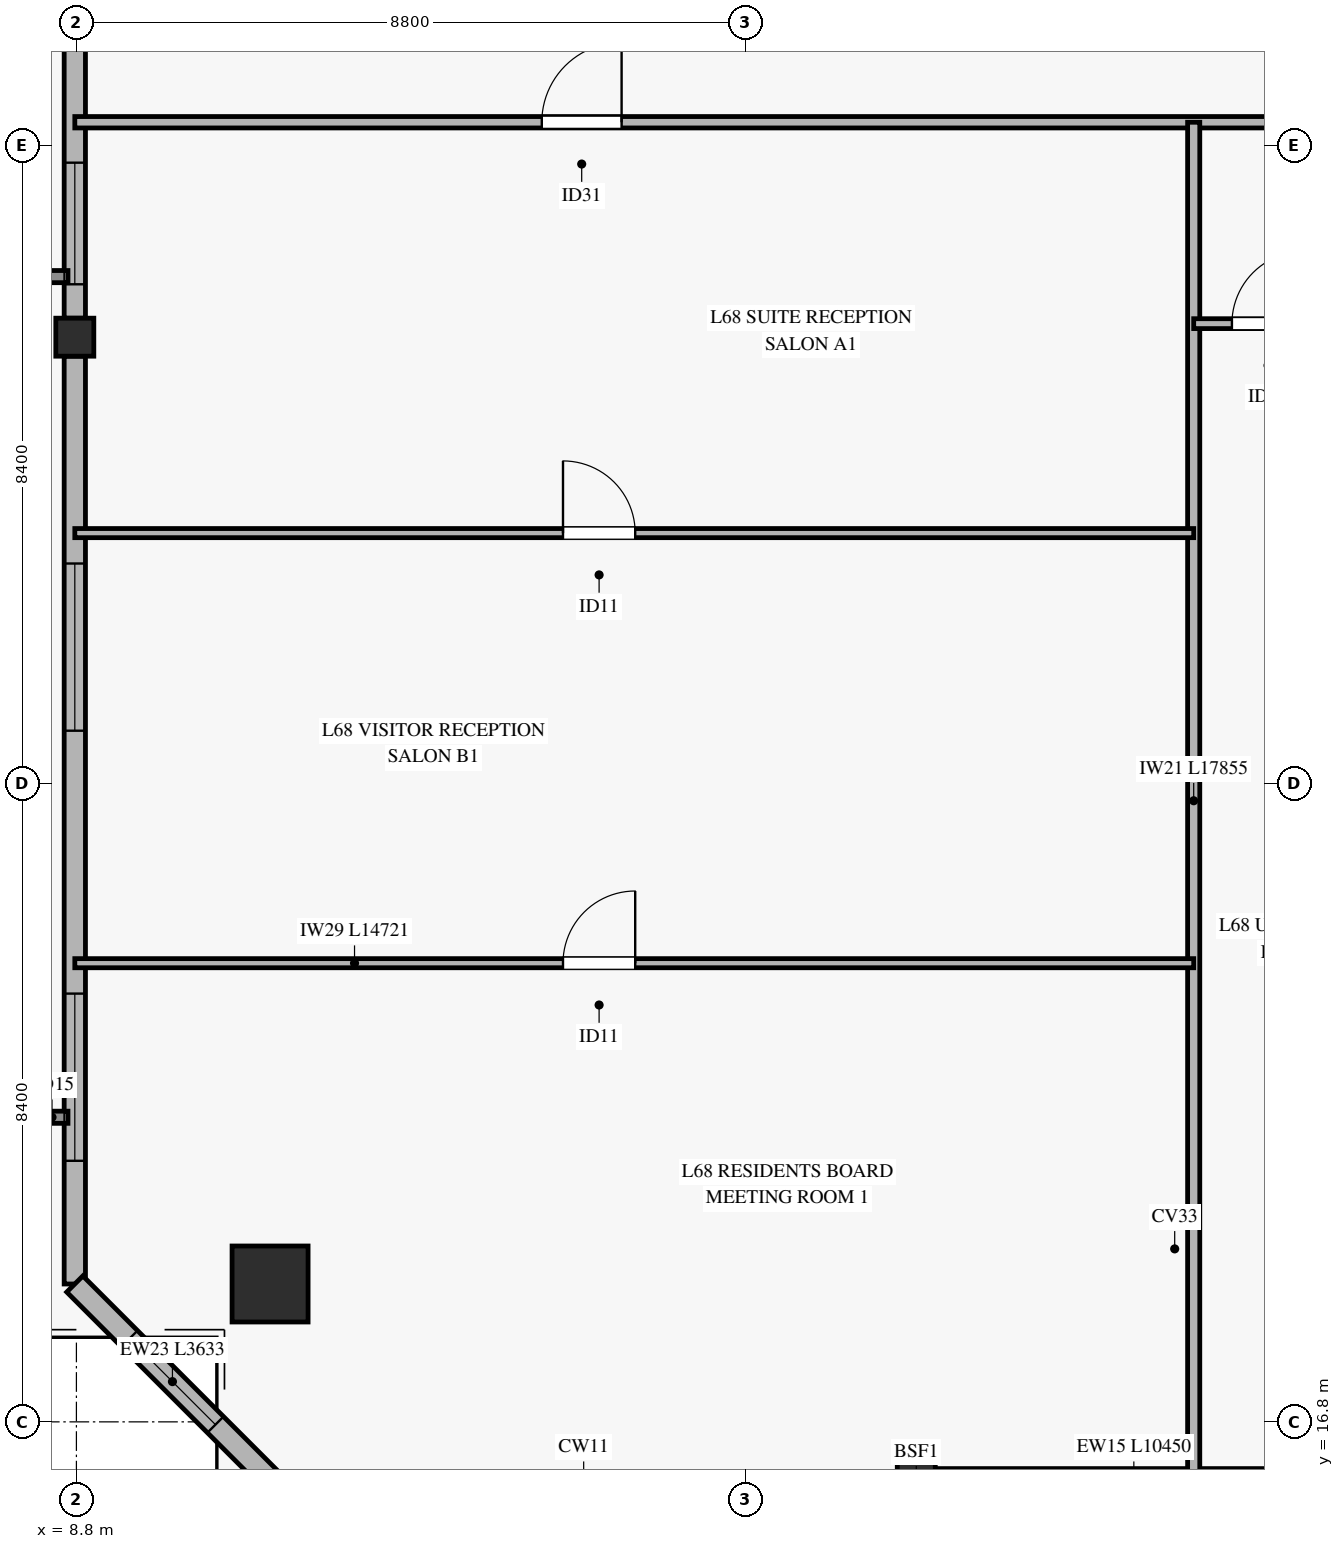
"""IFC4 building model, lengths in metres.
Left out: names, types, materials, properties, quantities, classifications, styles, units other than length and angle.
Written with IfcOpenShell. Run it as: python <this file> out.ifc"""

import sys

from ifc_helpers import new_model, si_unit, direction, frame, frame_2d, origin, origin_2d, place, context, subcontext, project, spatial, rectangle, hollow_rectangle, extrude, source, transform, mapped, element, fill, save


model = new_model("IFC4")
c1 = context("Model", 3, precision=1e-05, world=origin(), true_north=direction((0.0, 1.0)))
c2 = subcontext(c1, "Body", "Model", "MODEL_VIEW")
j1 = project(units=[si_unit("LENGTHUNIT", "METRE"), si_unit("PLANEANGLEUNIT", "RADIAN")], contexts=[c1])
p1 = place(None, origin())
s1 = spatial("IfcSite", under=j1, at=p1, CompositionType="ELEMENT")
p2 = place(p1, origin())
s2 = spatial("IfcBuilding", under=s1, at=p2, CompositionType="ELEMENT")
p3 = place(p2, frame((0.0, 0.0, 265.5)))
s3 = spatial("IfcBuildingStorey", under=s2, at=p3, CompositionType="ELEMENT", Elevation=265.5)
m1 = source(origin(), c2, "Body", "SweptSolid", [
    extrude(hollow_rectangle(XDim=1.0, YDim=1.0, WallThickness=0.045, at=origin_2d()), origin(), (0.0, 0.0, 1.0), 3.326),
])
p4 = place(p3, frame((11.348, 18.614, 0.0), z_axis=(0.110977181902, 0.266066325657, 0.957545181936), x_axis=(-0.922933739471, 0.384958845263, 0.0)))
e1 = element("IfcColumn", 1, at=p4, inside=s3, PredefinedType="COLUMN", context=c2, shape_type="MappedRepresentation", body=[
    mapped(m1, transform((0.0, 0.0, 0.0), x_axis=(1.0, 0.0, 0.0), y_axis=(0.0, 1.0, 0.0), z_axis=(0.0, 0.0, 1.0), scale=1.0)),
])
m2 = source(origin(), c2, "Body", "SweptSolid", [
    extrude(hollow_rectangle(XDim=0.5, YDim=0.5, WallThickness=0.024, at=origin_2d()), origin(), (0.0, 0.0, 1.0), 3.318),
])
p5 = place(p3, frame((19.85, 16.045, 0.0), z_axis=(0.0, 0.280604531731, 0.959823471672), x_axis=(-1.0, 0.0, 0.0)))
e2 = element("IfcColumn", 2, at=p5, inside=s3, PredefinedType="COLUMN", context=c2, shape_type="MappedRepresentation", body=[
    mapped(m2, transform((0.0, 0.0, 0.0), x_axis=(1.0, 0.0, 0.0), y_axis=(0.0, 1.0, 0.0), z_axis=(0.0, 0.0, 1.0), scale=1.0)),
])
m3 = source(origin(), c2, "Body", "SweptSolid", [
    extrude(hollow_rectangle(XDim=0.5, YDim=0.5, WallThickness=0.024, at=origin_2d()), origin(), (0.0, 0.0, 1.0), 3.246),
])
p6 = place(p3, frame((8.779, 31.072, 0.0), z_axis=(0.127876528395, 0.143597819239, 0.981339523201), x_axis=(-0.746804669772, 0.665043446104, 0.0)))
e3 = element("IfcColumn", 3, at=p6, inside=s3, PredefinedType="COLUMN", context=c2, shape_type="MappedRepresentation", body=[
    mapped(m3, transform((0.0, 0.0, 0.0), x_axis=(1.0, 0.0, 0.0), y_axis=(0.0, 1.0, 0.0), z_axis=(0.0, 0.0, 1.0), scale=1.0)),
])
p7 = place(p3, frame((20.1, 16.045, 0.0), z_axis=(0.0, 0.0, 1.0), x_axis=(1.0, 0.0, 0.0)))
e4 = element("IfcWall", 4, at=p7, inside=s3, PredefinedType="SOLIDWALL", context=c2, shape_type="SweptSolid", body=[
    extrude(rectangle(XDim=10.45, YDim=0.28, at=frame_2d((5.225, 0.0))), origin(), (0.0, 0.0, 1.0), 2.815),
])
p8 = place(p7, frame((4.3, 0.0, 0.0)))
e5 = element("IfcOpeningElement", 5, at=p8, cuts=e4, PredefinedType="OPENING", context=c2, shape_type="SweptSolid", body=[
    extrude(rectangle(XDim=1.8, YDim=2.25, at=frame_2d((0.9, 1.125))), frame((0.0, 0.15, 0.0), z_axis=(0.0, -1.0, 0.0), x_axis=(1.0, 0.0, 0.0)), (0.0, 0.0, 1.0), 0.3),
])
p9 = place(p7, frame((0.65, 0.0, 0.45)))
e6 = element("IfcOpeningElement", 6, at=p9, cuts=e4, PredefinedType="OPENING", context=c2, shape_type="SweptSolid", body=[
    extrude(rectangle(XDim=2.2, YDim=2.1, at=frame_2d((1.1, 1.05))), frame((0.0, 0.15, 0.0), z_axis=(0.0, -1.0, 0.0), x_axis=(1.0, 0.0, 0.0)), (0.0, 0.0, 1.0), 0.3),
])
p10 = place(p7, frame((7.35, 0.0, 0.45)))
e7 = element("IfcOpeningElement", 7, at=p10, cuts=e4, PredefinedType="OPENING", context=c2, shape_type="SweptSolid", body=[
    extrude(rectangle(XDim=1.6, YDim=2.0, at=frame_2d((0.8, 1.0))), frame((0.0, 0.15, 0.0), z_axis=(0.0, -1.0, 0.0), x_axis=(1.0, 0.0, 0.0)), (0.0, 0.0, 1.0), 0.3),
])
p11 = place(p3, frame((8.779, 18.614, 0.0), z_axis=(0.0, 0.0, 1.0), x_axis=(0.0, 1.0, 0.0)))
e8 = element("IfcWall", 8, at=p11, inside=s3, PredefinedType="SOLIDWALL", context=c2, shape_type="SweptSolid", body=[
    extrude(rectangle(XDim=12.208, YDim=0.28, at=frame_2d((6.104, 0.0))), origin(), (0.0, 0.0, 1.0), 2.815),
])
p12 = place(p11, frame((1.621, 0.0, 0.45)))
e9 = element("IfcOpeningElement", 9, at=p12, cuts=e8, PredefinedType="OPENING", context=c2, shape_type="SweptSolid", body=[
    extrude(rectangle(XDim=2.2, YDim=2.1, at=frame_2d((1.1, 1.05))), frame((0.0, 0.15, 0.0), z_axis=(0.0, -1.0, 0.0), x_axis=(1.0, 0.0, 0.0)), (0.0, 0.0, 1.0), 0.3),
])
p13 = place(p11, frame((7.28, 0.0, 0.45)))
e10 = element("IfcOpeningElement", 10, at=p13, cuts=e8, PredefinedType="OPENING", context=c2, shape_type="SweptSolid", body=[
    extrude(rectangle(XDim=2.2, YDim=2.1, at=frame_2d((1.1, 1.05))), frame((0.0, 0.15, 0.0), z_axis=(0.0, -1.0, 0.0), x_axis=(1.0, 0.0, 0.0)), (0.0, 0.0, 1.0), 0.3),
])
p14 = place(p3, frame((8.779, 31.322, 0.0), z_axis=(0.0, 0.0, 1.0), x_axis=(0.0, 1.0, 0.0)))
e11 = element("IfcWall", 11, at=p14, inside=s3, PredefinedType="SOLIDWALL", context=c2, shape_type="SweptSolid", body=[
    extrude(rectangle(XDim=12.208, YDim=0.28, at=frame_2d((6.104, 0.0))), origin(), (0.0, 0.0, 1.0), 2.815),
])
p15 = place(p14, frame((0.446, 0.0, 0.45)))
e12 = element("IfcOpeningElement", 12, at=p15, cuts=e11, PredefinedType="OPENING", context=c2, shape_type="SweptSolid", body=[
    extrude(rectangle(XDim=1.6, YDim=2.0, at=frame_2d((0.8, 1.0))), frame((0.0, 0.15, 0.0), z_axis=(0.0, -1.0, 0.0), x_axis=(1.0, 0.0, 0.0)), (0.0, 0.0, 1.0), 0.3),
])
p16 = place(p3, frame((8.779, 18.614, 0.0), z_axis=(0.0, 0.0, 1.0), x_axis=(0.707073180636, -0.70714038014, 0.0)))
e13 = element("IfcWall", 13, at=p16, inside=s3, PredefinedType="SOLIDWALL", context=c2, shape_type="SweptSolid", body=[
    extrude(rectangle(XDim=3.633, YDim=0.3, at=frame_2d((1.816, 0.0))), origin(), (0.0, 0.0, 1.0), 2.815),
])
p17 = place(p16, frame((1.017, 0.0, 0.45)))
e14 = element("IfcOpeningElement", 14, at=p17, cuts=e13, PredefinedType="OPENING", context=c2, shape_type="SweptSolid", body=[
    extrude(rectangle(XDim=1.6, YDim=2.0, at=frame_2d((0.8, 1.0))), frame((0.0, 0.16, 0.0), z_axis=(0.0, -1.0, 0.0), x_axis=(1.0, 0.0, 0.0)), (0.0, 0.0, 1.0), 0.32),
])
p18 = place(p3, frame((8.779, 33.9, 0.0), z_axis=(0.0, 0.0, 1.0), x_axis=(1.0, 0.0, 0.0)))
e15 = element("IfcWall", 15, at=p18, inside=s3, PredefinedType="PARTITIONING", context=c2, shape_type="SweptSolid", body=[
    extrude(rectangle(XDim=52.843, YDim=0.15, at=frame_2d((26.421, 0.0))), origin(), (0.0, 0.0, 1.0), 2.47),
])
p19 = place(p18, frame((6.144, 0.0, 0.0)))
e16 = element("IfcOpeningElement", 16, at=p19, cuts=e15, PredefinedType="OPENING", context=c2, shape_type="SweptSolid", body=[
    extrude(rectangle(XDim=1.05, YDim=2.15, at=frame_2d((0.525, 1.075))), frame((0.0, 0.085, 0.0), z_axis=(0.0, -1.0, 0.0), x_axis=(1.0, 0.0, 0.0)), (0.0, 0.0, 1.0), 0.17),
])
p20 = place(p18, frame((17.646, 0.0, 0.0)))
e17 = element("IfcOpeningElement", 17, at=p20, cuts=e15, PredefinedType="OPENING", context=c2, shape_type="SweptSolid", body=[
    extrude(rectangle(XDim=1.05, YDim=2.15, at=frame_2d((0.525, 1.075))), frame((0.0, 0.085, 0.0), z_axis=(0.0, -1.0, 0.0), x_axis=(1.0, 0.0, 0.0)), (0.0, 0.0, 1.0), 0.17),
])
p21 = place(p18, frame((24.174, 0.0, 0.0)))
e18 = element("IfcOpeningElement", 18, at=p21, cuts=e15, PredefinedType="OPENING", context=c2, shape_type="SweptSolid", body=[
    extrude(rectangle(XDim=1.05, YDim=2.15, at=frame_2d((0.525, 1.075))), frame((0.0, 0.085, 0.0), z_axis=(0.0, -1.0, 0.0), x_axis=(1.0, 0.0, 0.0)), (0.0, 0.0, 1.0), 0.17),
])
p22 = place(p18, frame((31.096, 0.0, 0.0)))
e19 = element("IfcOpeningElement", 19, at=p22, cuts=e15, PredefinedType="OPENING", context=c2, shape_type="SweptSolid", body=[
    extrude(rectangle(XDim=1.05, YDim=2.15, at=frame_2d((0.525, 1.075))), frame((0.0, 0.085, 0.0), z_axis=(0.0, -1.0, 0.0), x_axis=(1.0, 0.0, 0.0)), (0.0, 0.0, 1.0), 0.17),
])
p23 = place(p18, frame((37.241, 0.0, 0.0)))
e20 = element("IfcOpeningElement", 20, at=p23, cuts=e15, PredefinedType="OPENING", context=c2, shape_type="SweptSolid", body=[
    extrude(rectangle(XDim=1.05, YDim=2.15, at=frame_2d((0.525, 1.075))), frame((0.0, 0.085, 0.0), z_axis=(0.0, -1.0, 0.0), x_axis=(1.0, 0.0, 0.0)), (0.0, 0.0, 1.0), 0.17),
])
p24 = place(p18, frame((45.201, 0.0, 0.0)))
e21 = element("IfcOpeningElement", 21, at=p24, cuts=e15, PredefinedType="OPENING", context=c2, shape_type="SweptSolid", body=[
    extrude(rectangle(XDim=1.05, YDim=2.15, at=frame_2d((0.525, 1.075))), frame((0.0, 0.085, 0.0), z_axis=(0.0, -1.0, 0.0), x_axis=(1.0, 0.0, 0.0)), (0.0, 0.0, 1.0), 0.17),
])
p25 = place(p3, frame((23.5, 16.045, 0.0), z_axis=(0.0, 0.0, 1.0), x_axis=(0.0, 1.0, 0.0)))
e22 = element("IfcWall", 22, at=p25, inside=s3, PredefinedType="PARTITIONING", context=c2, shape_type="SweptSolid", body=[
    extrude(rectangle(XDim=17.855, YDim=0.16, at=frame_2d((8.927, 0.0))), origin(), (0.0, 0.0, 1.0), 2.77),
])
p26 = place(p3, frame((8.779, 22.835, 0.0), z_axis=(0.0, 0.0, 1.0), x_axis=(1.0, 0.0, 0.0)))
e23 = element("IfcWall", 23, at=p26, inside=s3, PredefinedType="PARTITIONING", context=c2, shape_type="SweptSolid", body=[
    extrude(rectangle(XDim=14.721, YDim=0.12, at=frame_2d((7.36, 0.0))), origin(), (0.0, 0.0, 1.0), 2.47),
])
p27 = place(p26, frame((6.423, 0.0, 0.0)))
e24 = element("IfcOpeningElement", 24, at=p27, cuts=e23, PredefinedType="OPENING", context=c2, shape_type="SweptSolid", body=[
    extrude(rectangle(XDim=0.95, YDim=2.1, at=frame_2d((0.475, 1.05))), frame((0.0, 0.07, 0.0), z_axis=(0.0, -1.0, 0.0), x_axis=(1.0, 0.0, 0.0)), (0.0, 0.0, 1.0), 0.14),
])
p28 = place(p3, frame((8.779, 28.494, 0.0), z_axis=(0.0, 0.0, 1.0), x_axis=(1.0, 0.0, 0.0)))
e25 = element("IfcWall", 25, at=p28, inside=s3, PredefinedType="PARTITIONING", context=c2, shape_type="SweptSolid", body=[
    extrude(rectangle(XDim=14.721, YDim=0.12, at=frame_2d((7.36, 0.0))), origin(), (0.0, 0.0, 1.0), 2.47),
])
p29 = place(p28, frame((6.423, 0.0, 0.0)))
e26 = element("IfcOpeningElement", 26, at=p29, cuts=e25, PredefinedType="OPENING", context=c2, shape_type="SweptSolid", body=[
    extrude(rectangle(XDim=0.95, YDim=2.1, at=frame_2d((0.475, 1.05))), frame((0.0, 0.07, 0.0), z_axis=(0.0, -1.0, 0.0), x_axis=(1.0, 0.0, 0.0)), (0.0, 0.0, 1.0), 0.14),
])
p30 = place(p3, frame((23.5, 31.25, 0.0), z_axis=(0.0, 0.0, 1.0), x_axis=(1.0, 0.0, 0.0)))
e27 = element("IfcWall", 27, at=p30, inside=s3, PredefinedType="PARTITIONING", context=c2, shape_type="SweptSolid", body=[
    extrude(rectangle(XDim=1.715, YDim=0.13, at=frame_2d((0.857, 0.0))), origin(), (0.0, 0.0, 1.0), 3.185),
])
p31 = place(p30, frame((0.503, 0.0, 0.0)))
e28 = element("IfcOpeningElement", 28, at=p31, cuts=e27, PredefinedType="OPENING", context=c2, shape_type="SweptSolid", body=[
    extrude(rectangle(XDim=0.95, YDim=2.1, at=frame_2d((0.475, 1.05))), frame((0.0, 0.075, 0.0), z_axis=(0.0, -1.0, 0.0), x_axis=(1.0, 0.0, 0.0)), (0.0, 0.0, 1.0), 0.15),
])
m4 = source(origin(), c2, "Body", "SweptSolid", [
    extrude(rectangle(XDim=2.2, YDim=2.1, at=frame_2d((1.1, 1.05))), frame((0.0, 0.03, 0.0), z_axis=(0.0, -1.0, 0.0), x_axis=(1.0, 0.0, 0.0)), (0.0, 0.0, 1.0), 0.06),
])
p32 = place(p12, origin())
e29 = element("IfcWindow", 29, at=p32, inside=s3, PartitioningType="SINGLE_PANEL", PredefinedType="WINDOW", context=c2, shape_type="MappedRepresentation", body=[
    mapped(m4, transform((0.0, 0.0, 0.0), x_axis=(1.0, 0.0, 0.0), y_axis=(0.0, 1.0, 0.0), z_axis=(0.0, 0.0, 1.0), scale=1.0)),
])
fill(e9, e29)
p33 = place(p13, origin())
e30 = element("IfcWindow", 30, at=p33, inside=s3, PartitioningType="SINGLE_PANEL", PredefinedType="WINDOW", context=c2, shape_type="MappedRepresentation", body=[
    mapped(m4, transform((0.0, 0.0, 0.0), x_axis=(1.0, 0.0, 0.0), y_axis=(0.0, 1.0, 0.0), z_axis=(0.0, 0.0, 1.0), scale=1.0)),
])
fill(e10, e30)
m5 = source(origin(), c2, "Body", "SweptSolid", [
    extrude(rectangle(XDim=1.6, YDim=2.0, at=frame_2d((0.8, 1.0))), frame((0.0, 0.03, 0.0), z_axis=(0.0, -1.0, 0.0), x_axis=(1.0, 0.0, 0.0)), (0.0, 0.0, 1.0), 0.06),
])
p34 = place(p15, origin())
e31 = element("IfcWindow", 31, at=p34, inside=s3, PartitioningType="SINGLE_PANEL", PredefinedType="WINDOW", context=c2, shape_type="MappedRepresentation", body=[
    mapped(m5, transform((0.0, 0.0, 0.0), x_axis=(1.0, 0.0, 0.0), y_axis=(0.0, 1.0, 0.0), z_axis=(0.0, 0.0, 1.0), scale=1.0)),
])
fill(e12, e31)
p35 = place(p17, origin())
e32 = element("IfcWindow", 32, at=p35, inside=s3, PartitioningType="SINGLE_PANEL", PredefinedType="WINDOW", context=c2, shape_type="MappedRepresentation", body=[
    mapped(m5, transform((0.0, 0.0, 0.0), x_axis=(1.0, 0.0, 0.0), y_axis=(0.0, 1.0, 0.0), z_axis=(0.0, 0.0, 1.0), scale=1.0)),
])
fill(e14, e32)
m6 = source(origin(), c2, "Body", "SweptSolid", [
    extrude(rectangle(XDim=1.05, YDim=2.15, at=frame_2d((0.525, 1.075))), frame((0.0, 0.025, 0.0), z_axis=(0.0, -1.0, 0.0), x_axis=(1.0, 0.0, 0.0)), (0.0, 0.0, 1.0), 0.05),
])
p36 = place(p19, origin())
e33 = element("IfcDoor", 33, at=p36, inside=s3, OperationType="SINGLE_SWING_RIGHT", PredefinedType="DOOR", context=c2, shape_type="MappedRepresentation", body=[
    mapped(m6, transform((0.0, 0.0, 0.0), x_axis=(1.0, 0.0, 0.0), y_axis=(0.0, 1.0, 0.0), z_axis=(0.0, 0.0, 1.0), scale=1.0)),
])
fill(e16, e33)
m7 = source(origin(), c2, "Body", "SweptSolid", [
    extrude(rectangle(XDim=0.95, YDim=2.1, at=frame_2d((0.475, 1.05))), frame((0.0, 0.025, 0.0), z_axis=(0.0, -1.0, 0.0), x_axis=(1.0, 0.0, 0.0)), (0.0, 0.0, 1.0), 0.05),
])
p37 = place(p29, origin())
e34 = element("IfcDoor", 34, at=p37, inside=s3, OperationType="SINGLE_SWING_LEFT", PredefinedType="DOOR", context=c2, shape_type="MappedRepresentation", body=[
    mapped(m7, transform((0.0, 0.0, 0.0), x_axis=(1.0, 0.0, 0.0), y_axis=(0.0, 1.0, 0.0), z_axis=(0.0, 0.0, 1.0), scale=1.0)),
])
fill(e26, e34)
p38 = place(p27, origin())
e35 = element("IfcDoor", 35, at=p38, inside=s3, OperationType="SINGLE_SWING_RIGHT", PredefinedType="DOOR", context=c2, shape_type="MappedRepresentation", body=[
    mapped(m7, transform((0.0, 0.0, 0.0), x_axis=(1.0, 0.0, 0.0), y_axis=(0.0, 1.0, 0.0), z_axis=(0.0, 0.0, 1.0), scale=1.0)),
])
fill(e24, e35)
p39 = place(p31, origin())
e36 = element("IfcDoor", 36, at=p39, inside=s3, OperationType="SINGLE_SWING_RIGHT", PredefinedType="DOOR", context=c2, shape_type="MappedRepresentation", body=[
    mapped(m7, transform((0.0, 0.0, 0.0), x_axis=(1.0, 0.0, 0.0), y_axis=(0.0, 1.0, 0.0), z_axis=(0.0, 0.0, 1.0), scale=1.0)),
])
fill(e28, e36)
save(model, sys.argv[1])
